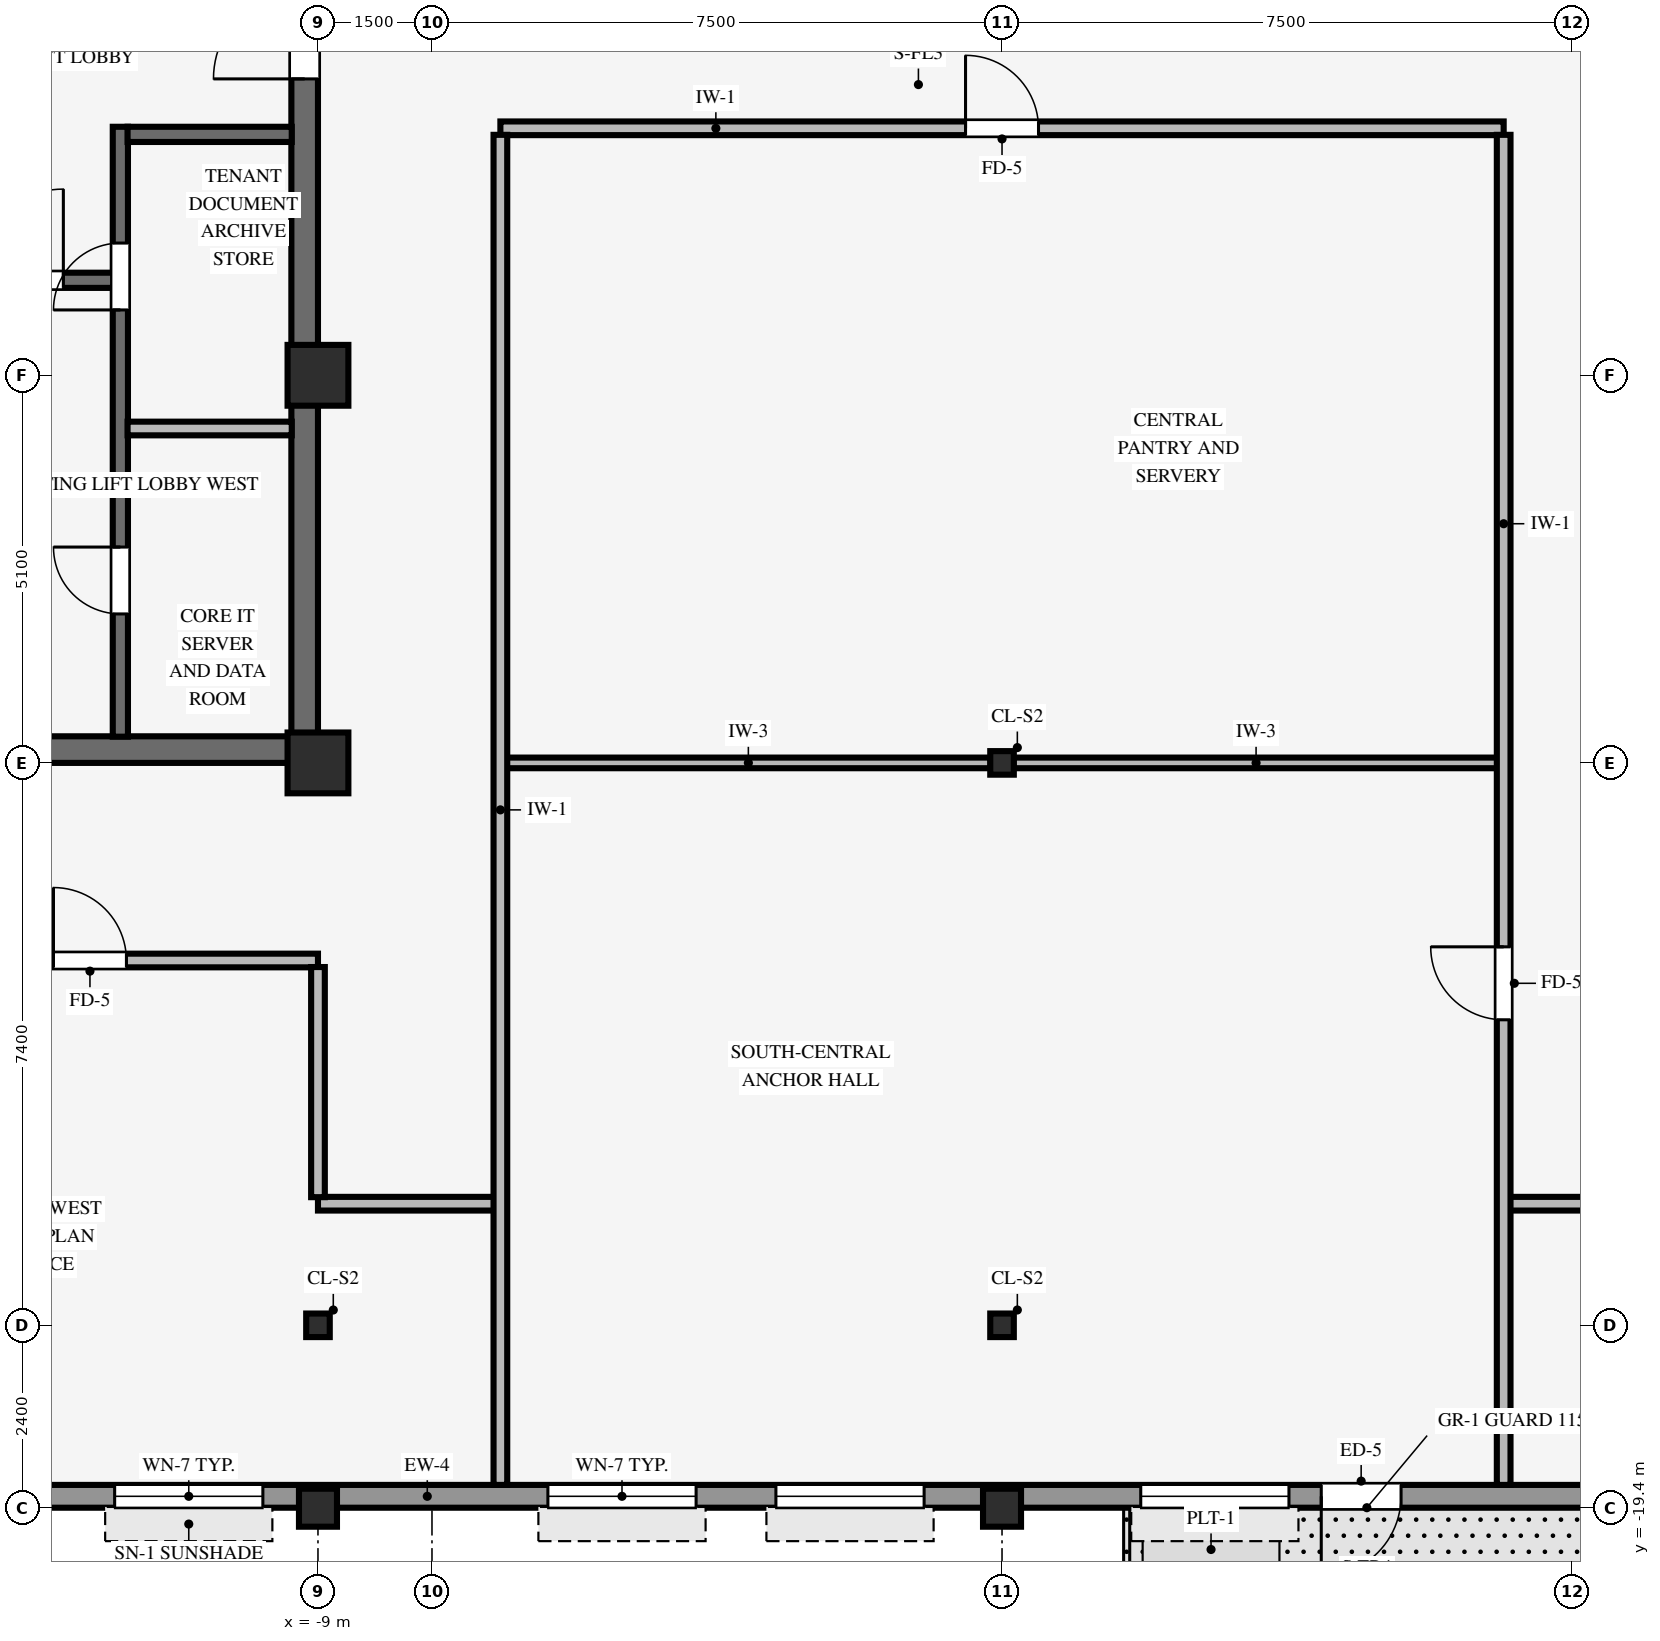
"""IFC4 building model, lengths in metres.
Left out: names, types, materials, properties, quantities, classifications, styles, units other than length and angle.
Written with IfcOpenShell. Run it as: python <this file> out.ifc"""

import sys

from ifc_helpers import new_model, si_unit, direction, frame, frame_2d, origin, origin_2d, place, context, subcontext, project, spatial, rectangle, hollow_rectangle, i_section, extrude, source, transform, mapped, element, fill, save


model = new_model("IFC4")
c1 = context("Model", 3, precision=1e-05, world=origin(), true_north=direction((0.0, 1.0)))
c2 = subcontext(c1, "Body", "Model", "MODEL_VIEW")
j1 = project(units=[si_unit("LENGTHUNIT", "METRE"), si_unit("PLANEANGLEUNIT", "RADIAN")], contexts=[c1])
p1 = place(None, origin())
s1 = spatial("IfcSite", under=j1, at=p1, CompositionType="ELEMENT")
p2 = place(p1, origin())
s2 = spatial("IfcBuilding", under=s1, at=p2, CompositionType="ELEMENT")
p3 = place(p2, frame((0.0, 0.0, 245.65)))
s3 = spatial("IfcBuildingStorey", under=s2, at=p3, CompositionType="ELEMENT", Elevation=245.65)
p4 = place(p3, frame((-17.5, -9.425, 0.0), z_axis=(0.0, 0.0, 1.0), x_axis=(1.0, 0.0, 0.0)))
e1 = element("IfcWall", 1, at=p4, inside=s3, PredefinedType="SHEAR", context=c2, shape_type="SweptSolid", body=[
    extrude(rectangle(XDim=8.5, YDim=0.35, at=frame_2d((4.25, 0.0))), origin(), (0.0, 0.0, 1.0), 3.37),
])
p5 = place(p3, frame((-9.175, -9.255, 0.0), z_axis=(0.0, 0.0, 1.0), x_axis=(0.0, 1.0, 0.0)))
e2 = element("IfcWall", 2, at=p5, inside=s3, PredefinedType="SHEAR", context=c2, shape_type="SweptSolid", body=[
    extrude(rectangle(XDim=18.51, YDim=0.35, at=frame_2d((9.255, 0.0))), origin(), (0.0, 0.0, 1.0), 3.37),
])
p6 = place(p5, frame((8.655, 0.0, 0.0)))
e3 = element("IfcOpeningElement", 3, at=p6, cuts=e2, PredefinedType="OPENING", context=c2, shape_type="SweptSolid", body=[
    extrude(rectangle(XDim=1.2, YDim=2.15, at=frame_2d((0.6, 1.075))), frame((0.0, 0.185, 0.0), z_axis=(0.0, -1.0, 0.0), x_axis=(1.0, 0.0, 0.0)), (0.0, 0.0, 1.0), 0.37),
])
for number, where, z_axis, x_axis in (
    (4, (-9.0, -9.6, 0.0), (0.0, 0.0, 1.0), (1.0, 0.0, 0.0)),
    (5, (-9.0, -4.5, 0.0), (0.0, 0.0, 1.0), (1.0, 0.0, 0.0)),
):
    element("IfcColumn", number, at=place(p3, frame(where, z_axis=z_axis, x_axis=x_axis)), inside=s3, PredefinedType="COLUMN", context=c2, shape_type="SweptSolid", body=[
        extrude(rectangle(XDim=0.8, YDim=0.8, at=origin_2d()), origin(), (0.0, 0.0, 1.0), 3.37),
    ])
for number, where, z_axis, x_axis in (
    (6, (-9.0, -19.4, 0.0), (0.0, 0.0, 1.0), (1.0, 0.0, 0.0)),
    (7, (0.0, -19.4, 0.0), (0.0, 0.0, 1.0), (1.0, 0.0, 0.0)),
):
    element("IfcColumn", number, at=place(p3, frame(where, z_axis=z_axis, x_axis=x_axis)), inside=s3, PredefinedType="COLUMN", context=c2, shape_type="SweptSolid", body=[
        extrude(hollow_rectangle(XDim=0.5, YDim=0.5, WallThickness=0.032, InnerFilletRadius=0.032, OuterFilletRadius=0.064, at=origin_2d()), origin(), (0.0, 0.0, 1.0), 3.37),
    ])
for number, where, z_axis, x_axis in (
    (8, (0.0, -17.0, 0.0), (0.0, 0.0, 1.0), (1.0, 0.0, 0.0)),
    (9, (0.0, -9.6, 0.0), (0.0, 0.0, 1.0), (1.0, 0.0, 0.0)),
    (10, (-9.0, -17.0, 0.0), (0.0, 0.0, 1.0), (1.0, 0.0, 0.0)),
):
    element("IfcColumn", number, at=place(p3, frame(where, z_axis=z_axis, x_axis=x_axis)), inside=s3, PredefinedType="COLUMN", context=c2, shape_type="SweptSolid", body=[
        extrude(i_section(OverallWidth=0.31, OverallDepth=0.31, WebThickness=0.015, FlangeThickness=0.015, FilletRadius=0.015, at=origin_2d()), origin(), (0.0, 0.0, 1.0), 3.37),
    ])
p7 = place(p3, frame((-18.9, -19.25, 0.0), z_axis=(0.0, 0.0, 1.0), x_axis=(1.0, 0.0, 0.0)))
e11 = element("IfcWall", 11, at=p7, inside=s3, PredefinedType="STANDARD", context=c2, shape_type="SweptSolid", body=[
    extrude(rectangle(XDim=35.6, YDim=0.3, at=frame_2d((17.8, 0.0))), origin(), (0.0, 0.0, 1.0), 2.705),
])
p8 = place(p7, frame((24.15, 0.0, 0.0), z_axis=(0.0, 0.0, 1.0), x_axis=(-1.0, 0.0, 0.0)))
e12 = element("IfcOpeningElement", 12, at=p8, cuts=e11, PredefinedType="OPENING", context=c2, shape_type="SweptSolid", body=[
    extrude(rectangle(XDim=1.05, YDim=2.1, at=frame_2d((0.525, 1.05))), frame((0.0, 0.16, 0.0), z_axis=(0.0, -1.0, 0.0), x_axis=(1.0, 0.0, 0.0)), (0.0, 0.0, 1.0), 0.32),
])
p9 = place(p7, frame((2.425, 0.0, 0.8)))
e13 = element("IfcOpeningElement", 13, at=p9, cuts=e11, PredefinedType="OPENING", context=c2, shape_type="SweptSolid", body=[
    extrude(rectangle(XDim=1.95, YDim=1.48, at=frame_2d((0.975, 0.74))), frame((0.0, 0.16, 0.0), z_axis=(0.0, -1.0, 0.0), x_axis=(1.0, 0.0, 0.0)), (0.0, 0.0, 1.0), 0.32),
])
p10 = place(p7, frame((7.225, 0.0, 0.8)))
e14 = element("IfcOpeningElement", 14, at=p10, cuts=e11, PredefinedType="OPENING", context=c2, shape_type="SweptSolid", body=[
    extrude(rectangle(XDim=1.95, YDim=1.48, at=frame_2d((0.975, 0.74))), frame((0.0, 0.16, 0.0), z_axis=(0.0, -1.0, 0.0), x_axis=(1.0, 0.0, 0.0)), (0.0, 0.0, 1.0), 0.32),
])
p11 = place(p7, frame((12.925, 0.0, 0.8)))
e15 = element("IfcOpeningElement", 15, at=p11, cuts=e11, PredefinedType="OPENING", context=c2, shape_type="SweptSolid", body=[
    extrude(rectangle(XDim=1.95, YDim=1.48, at=frame_2d((0.975, 0.74))), frame((0.0, 0.16, 0.0), z_axis=(0.0, -1.0, 0.0), x_axis=(1.0, 0.0, 0.0)), (0.0, 0.0, 1.0), 0.32),
])
p12 = place(p7, frame((15.925, 0.0, 0.8)))
e16 = element("IfcOpeningElement", 16, at=p12, cuts=e11, PredefinedType="OPENING", context=c2, shape_type="SweptSolid", body=[
    extrude(rectangle(XDim=1.95, YDim=1.48, at=frame_2d((0.975, 0.74))), frame((0.0, 0.16, 0.0), z_axis=(0.0, -1.0, 0.0), x_axis=(1.0, 0.0, 0.0)), (0.0, 0.0, 1.0), 0.32),
])
p13 = place(p7, frame((20.725, 0.0, 0.8)))
e17 = element("IfcOpeningElement", 17, at=p13, cuts=e11, PredefinedType="OPENING", context=c2, shape_type="SweptSolid", body=[
    extrude(rectangle(XDim=1.95, YDim=1.48, at=frame_2d((0.975, 0.74))), frame((0.0, 0.16, 0.0), z_axis=(0.0, -1.0, 0.0), x_axis=(1.0, 0.0, 0.0)), (0.0, 0.0, 1.0), 0.32),
])
p14 = place(p7, frame((31.225, 0.0, 0.8)))
e18 = element("IfcOpeningElement", 18, at=p14, cuts=e11, PredefinedType="OPENING", context=c2, shape_type="SweptSolid", body=[
    extrude(rectangle(XDim=1.95, YDim=1.48, at=frame_2d((0.975, 0.74))), frame((0.0, 0.16, 0.0), z_axis=(0.0, -1.0, 0.0), x_axis=(1.0, 0.0, 0.0)), (0.0, 0.0, 1.0), 0.32),
])
p15 = place(p3, frame((-11.6, -9.255, 0.0), z_axis=(0.0, 0.0, 1.0), x_axis=(0.0, 1.0, 0.0)))
e19 = element("IfcWall", 19, at=p15, inside=s3, PredefinedType="SHEAR", context=c2, shape_type="SweptSolid", body=[
    extrude(rectangle(XDim=8.025, YDim=0.2, at=frame_2d((4.012, 0.0))), origin(), (0.0, 0.0, 1.0), 3.37),
])
p16 = place(p15, frame((1.615, 0.0, 0.0)))
e20 = element("IfcOpeningElement", 20, at=p16, cuts=e19, PredefinedType="OPENING", context=c2, shape_type="SweptSolid", body=[
    extrude(rectangle(XDim=0.88, YDim=2.1, at=frame_2d((0.44, 1.05))), frame((0.0, 0.11, 0.0), z_axis=(0.0, -1.0, 0.0), x_axis=(1.0, 0.0, 0.0)), (0.0, 0.0, 1.0), 0.22),
])
p17 = place(p15, frame((5.615, 0.0, 0.0)))
e21 = element("IfcOpeningElement", 21, at=p17, cuts=e19, PredefinedType="OPENING", context=c2, shape_type="SweptSolid", body=[
    extrude(rectangle(XDim=0.88, YDim=2.1, at=frame_2d((0.44, 1.05))), frame((0.0, 0.11, 0.0), z_axis=(0.0, -1.0, 0.0), x_axis=(1.0, 0.0, 0.0)), (0.0, 0.0, 1.0), 0.22),
])
p18 = place(p3, frame((-14.255, -3.25, 0.0), z_axis=(0.0, 0.0, 1.0), x_axis=(1.0, 0.0, 0.0)))
e22 = element("IfcWall", 22, at=p18, inside=s3, PredefinedType="SHEAR", context=c2, shape_type="SweptSolid", body=[
    extrude(rectangle(XDim=2.56, YDim=0.2, at=frame_2d((1.28, 0.0))), origin(), (0.0, 0.0, 1.0), 3.37),
])
p19 = place(p18, frame((0.705, 0.0, 0.0)))
e23 = element("IfcOpeningElement", 23, at=p19, cuts=e22, PredefinedType="OPENING", context=c2, shape_type="SweptSolid", body=[
    extrude(rectangle(XDim=1.2, YDim=2.15, at=frame_2d((0.6, 1.075))), frame((0.0, 0.11, 0.0), z_axis=(0.0, -1.0, 0.0), x_axis=(1.0, 0.0, 0.0)), (0.0, 0.0, 1.0), 0.22),
])
p20 = place(p3, frame((-11.505, -1.33, 0.0), z_axis=(0.0, 0.0, 1.0), x_axis=(1.0, 0.0, 0.0)))
e24 = element("IfcWall", 24, at=p20, inside=s3, PredefinedType="SHEAR", context=c2, shape_type="SweptSolid", body=[
    extrude(rectangle(XDim=2.16, YDim=0.2, at=frame_2d((1.08, 0.0))), origin(), (0.0, 0.0, 1.0), 3.37),
])
p21 = place(p3, frame((-11.505, -5.2, 0.0), z_axis=(0.0, 0.0, 1.0), x_axis=(1.0, 0.0, 0.0)))
e25 = element("IfcWall", 25, at=p21, inside=s3, PredefinedType="PARTITIONING", context=c2, shape_type="SweptSolid", body=[
    extrude(rectangle(XDim=2.16, YDim=0.18, at=frame_2d((1.08, 0.0))), origin(), (0.0, 0.0, 1.0), 3.36),
])
p22 = place(p3, frame((-9.0, -15.4, 0.0), z_axis=(0.0, 0.0, 1.0), x_axis=(1.0, 0.0, 0.0)))
e26 = element("IfcWall", 26, at=p22, inside=s3, PredefinedType="PARTITIONING", context=c2, shape_type="SweptSolid", body=[
    extrude(rectangle(XDim=2.324, YDim=0.18, at=frame_2d((1.162, 0.0))), origin(), (0.0, 0.0, 1.0), 3.36),
])
p23 = place(p3, frame((6.666, -15.4, 0.0), z_axis=(0.0, 0.0, 1.0), x_axis=(1.0, 0.0, 0.0)))
e27 = element("IfcWall", 27, at=p23, inside=s3, PredefinedType="PARTITIONING", context=c2, shape_type="SweptSolid", body=[
    extrude(rectangle(XDim=2.334, YDim=0.18, at=frame_2d((1.167, 0.0))), origin(), (0.0, 0.0, 1.0), 3.36),
])
p24 = place(p3, frame((-15.0, -12.2, 0.0), z_axis=(0.0, 0.0, 1.0), x_axis=(1.0, 0.0, 0.0)))
e28 = element("IfcWall", 28, at=p24, inside=s3, PredefinedType="PARTITIONING", context=c2, shape_type="SweptSolid", body=[
    extrude(rectangle(XDim=6.0, YDim=0.18, at=frame_2d((3.0, 0.0))), origin(), (0.0, 0.0, 1.0), 3.36),
])
p25 = place(p24, frame((2.52, 0.0, 0.0)))
e29 = element("IfcOpeningElement", 29, at=p25, cuts=e28, PredefinedType="OPENING", context=c2, shape_type="SweptSolid", body=[
    extrude(rectangle(XDim=0.96, YDim=2.1, at=frame_2d((0.48, 1.05))), frame((0.0, 0.1, 0.0), z_axis=(0.0, -1.0, 0.0), x_axis=(1.0, 0.0, 0.0)), (0.0, 0.0, 1.0), 0.2),
])
p26 = place(p3, frame((-6.524, -9.6, 0.0), z_axis=(0.0, 0.0, 1.0), x_axis=(1.0, 0.0, 0.0)))
e30 = element("IfcWall", 30, at=p26, inside=s3, PredefinedType="PARTITIONING", context=c2, shape_type="SweptSolid", body=[
    extrude(rectangle(XDim=6.373, YDim=0.14, at=frame_2d((3.187, 0.0))), origin(), (0.0, 0.0, 1.0), 2.405),
])
p27 = place(p3, frame((0.151, -9.6, 0.0), z_axis=(0.0, 0.0, 1.0), x_axis=(1.0, 0.0, 0.0)))
e31 = element("IfcWall", 31, at=p27, inside=s3, PredefinedType="PARTITIONING", context=c2, shape_type="SweptSolid", body=[
    extrude(rectangle(XDim=6.383, YDim=0.14, at=frame_2d((3.191, 0.0))), origin(), (0.0, 0.0, 1.0), 2.405),
])
p28 = place(p3, frame((-6.6, -1.25, 0.0), z_axis=(0.0, 0.0, 1.0), x_axis=(1.0, 0.0, 0.0)))
e32 = element("IfcWall", 32, at=p28, inside=s3, PredefinedType="PARTITIONING", context=c2, shape_type="SweptSolid", body=[
    extrude(rectangle(XDim=13.2, YDim=0.18, at=frame_2d((6.6, 0.0))), origin(), (0.0, 0.0, 1.0), 3.36),
])
p29 = place(p28, frame((6.12, 0.0, 0.0)))
e33 = element("IfcOpeningElement", 33, at=p29, cuts=e32, PredefinedType="OPENING", context=c2, shape_type="SweptSolid", body=[
    extrude(rectangle(XDim=0.96, YDim=2.1, at=frame_2d((0.48, 1.05))), frame((0.0, 0.1, 0.0), z_axis=(0.0, -1.0, 0.0), x_axis=(1.0, 0.0, 0.0)), (0.0, 0.0, 1.0), 0.2),
])
p30 = place(p3, frame((-9.0, -15.314, 0.0), z_axis=(0.0, 0.0, 1.0), x_axis=(0.0, 1.0, 0.0)))
e34 = element("IfcWall", 34, at=p30, inside=s3, PredefinedType="PARTITIONING", context=c2, shape_type="SweptSolid", body=[
    extrude(rectangle(XDim=3.028, YDim=0.18, at=frame_2d((1.514, 0.0))), origin(), (0.0, 0.0, 1.0), 2.892),
])
p31 = place(p3, frame((-6.6, -19.1, 0.0), z_axis=(0.0, 0.0, 1.0), x_axis=(0.0, 1.0, 0.0)))
e35 = element("IfcWall", 35, at=p31, inside=s3, PredefinedType="PARTITIONING", context=c2, shape_type="SweptSolid", body=[
    extrude(rectangle(XDim=17.764, YDim=0.18, at=frame_2d((8.882, 0.0))), origin(), (0.0, 0.0, 1.0), 3.36),
])
p32 = place(p3, frame((6.6, -19.1, 0.0), z_axis=(0.0, 0.0, 1.0), x_axis=(0.0, 1.0, 0.0)))
e36 = element("IfcWall", 36, at=p32, inside=s3, PredefinedType="PARTITIONING", context=c2, shape_type="SweptSolid", body=[
    extrude(rectangle(XDim=17.764, YDim=0.18, at=frame_2d((8.882, 0.0))), origin(), (0.0, 0.0, 1.0), 3.36),
])
p33 = place(p32, frame((6.12, 0.0, 0.0)))
e37 = element("IfcOpeningElement", 37, at=p33, cuts=e36, PredefinedType="OPENING", context=c2, shape_type="SweptSolid", body=[
    extrude(rectangle(XDim=0.96, YDim=2.1, at=frame_2d((0.48, 1.05))), frame((0.0, 0.1, 0.0), z_axis=(0.0, -1.0, 0.0), x_axis=(1.0, 0.0, 0.0)), (0.0, 0.0, 1.0), 0.2),
])
m1 = source(origin(), c2, "Body", "SweptSolid", [
    extrude(rectangle(XDim=1.05, YDim=2.1, at=frame_2d((0.525, 1.05))), frame((0.0, 0.025, 0.0), z_axis=(0.0, -1.0, 0.0), x_axis=(1.0, 0.0, 0.0)), (0.0, 0.0, 1.0), 0.05),
])
p34 = place(p8, origin())
e38 = element("IfcDoor", 38, at=p34, inside=s3, OperationType="SINGLE_SWING_RIGHT", PredefinedType="DOOR", context=c2, shape_type="MappedRepresentation", body=[
    mapped(m1, transform((0.0, 0.0, 0.0), scale=1.0)),
])
fill(e12, e38)
m2 = source(origin(), c2, "Body", "SweptSolid", [
    extrude(rectangle(XDim=1.95, YDim=1.48, at=frame_2d((0.975, 0.74))), frame((0.0, 0.03, 0.0), z_axis=(0.0, -1.0, 0.0), x_axis=(1.0, 0.0, 0.0)), (0.0, 0.0, 1.0), 0.06),
])
p35 = place(p10, origin())
e39 = element("IfcWindow", 39, at=p35, inside=s3, PartitioningType="SINGLE_PANEL", PredefinedType="WINDOW", context=c2, shape_type="MappedRepresentation", body=[
    mapped(m2, transform((0.0, 0.0, 0.0), scale=1.0)),
])
fill(e14, e39)
p36 = place(p11, origin())
e40 = element("IfcWindow", 40, at=p36, inside=s3, PartitioningType="SINGLE_PANEL", PredefinedType="WINDOW", context=c2, shape_type="MappedRepresentation", body=[
    mapped(m2, transform((0.0, 0.0, 0.0), scale=1.0)),
])
fill(e15, e40)
p37 = place(p12, origin())
e41 = element("IfcWindow", 41, at=p37, inside=s3, PartitioningType="SINGLE_PANEL", PredefinedType="WINDOW", context=c2, shape_type="MappedRepresentation", body=[
    mapped(m2, transform((0.0, 0.0, 0.0), scale=1.0)),
])
fill(e16, e41)
p38 = place(p13, origin())
e42 = element("IfcWindow", 42, at=p38, inside=s3, PartitioningType="SINGLE_PANEL", PredefinedType="WINDOW", context=c2, shape_type="MappedRepresentation", body=[
    mapped(m2, transform((0.0, 0.0, 0.0), scale=1.0)),
])
fill(e17, e42)
m3 = source(origin(), c2, "Body", "SweptSolid", [
    extrude(rectangle(XDim=1.2, YDim=2.15, at=frame_2d((0.6, 1.075))), frame((0.0, 0.025, 0.0), z_axis=(0.0, -1.0, 0.0), x_axis=(1.0, 0.0, 0.0)), (0.0, 0.0, 1.0), 0.05),
])
p39 = place(p19, origin())
e43 = element("IfcDoor", 43, at=p39, inside=s3, OperationType="SINGLE_SWING_RIGHT", PredefinedType="DOOR", context=c2, shape_type="MappedRepresentation", body=[
    mapped(m3, transform((0.0, 0.0, 0.0), scale=1.0)),
])
fill(e23, e43)
m4 = source(origin(), c2, "Body", "SweptSolid", [
    extrude(rectangle(XDim=0.88, YDim=2.1, at=frame_2d((0.44, 1.05))), frame((0.0, 0.025, 0.0), z_axis=(0.0, -1.0, 0.0), x_axis=(1.0, 0.0, 0.0)), (0.0, 0.0, 1.0), 0.05),
])
p40 = place(p16, origin())
e44 = element("IfcDoor", 44, at=p40, inside=s3, OperationType="SINGLE_SWING_RIGHT", PredefinedType="DOOR", context=c2, shape_type="MappedRepresentation", body=[
    mapped(m4, transform((0.0, 0.0, 0.0), scale=1.0)),
])
fill(e20, e44)
p41 = place(p17, origin())
e45 = element("IfcDoor", 45, at=p41, inside=s3, OperationType="SINGLE_SWING_LEFT", PredefinedType="DOOR", context=c2, shape_type="MappedRepresentation", body=[
    mapped(m4, transform((0.0, 0.0, 0.0), scale=1.0)),
])
fill(e21, e45)
p42 = place(p6, origin())
e46 = element("IfcDoor", 46, at=p42, inside=s3, OperationType="SINGLE_SWING_LEFT", PredefinedType="DOOR", context=c2, shape_type="MappedRepresentation", body=[
    mapped(m3, transform((0.0, 0.0, 0.0), scale=1.0)),
])
fill(e3, e46)
m5 = source(origin(), c2, "Body", "SweptSolid", [
    extrude(rectangle(XDim=0.96, YDim=2.1, at=frame_2d((0.48, 1.05))), frame((0.0, 0.025, 0.0), z_axis=(0.0, -1.0, 0.0), x_axis=(1.0, 0.0, 0.0)), (0.0, 0.0, 1.0), 0.05),
])
p43 = place(p29, origin())
e47 = element("IfcDoor", 47, at=p43, inside=s3, OperationType="SINGLE_SWING_LEFT", PredefinedType="DOOR", context=c2, shape_type="MappedRepresentation", body=[
    mapped(m5, transform((0.0, 0.0, 0.0), scale=1.0)),
])
fill(e33, e47)
p44 = place(p25, origin())
e48 = element("IfcDoor", 48, at=p44, inside=s3, OperationType="SINGLE_SWING_LEFT", PredefinedType="DOOR", context=c2, shape_type="MappedRepresentation", body=[
    mapped(m5, transform((0.0, 0.0, 0.0), scale=1.0)),
])
fill(e29, e48)
p45 = place(p33, origin())
e49 = element("IfcDoor", 49, at=p45, inside=s3, OperationType="SINGLE_SWING_RIGHT", PredefinedType="DOOR", context=c2, shape_type="MappedRepresentation", body=[
    mapped(m5, transform((0.0, 0.0, 0.0), scale=1.0)),
])
fill(e37, e49)
save(model, sys.argv[1])
